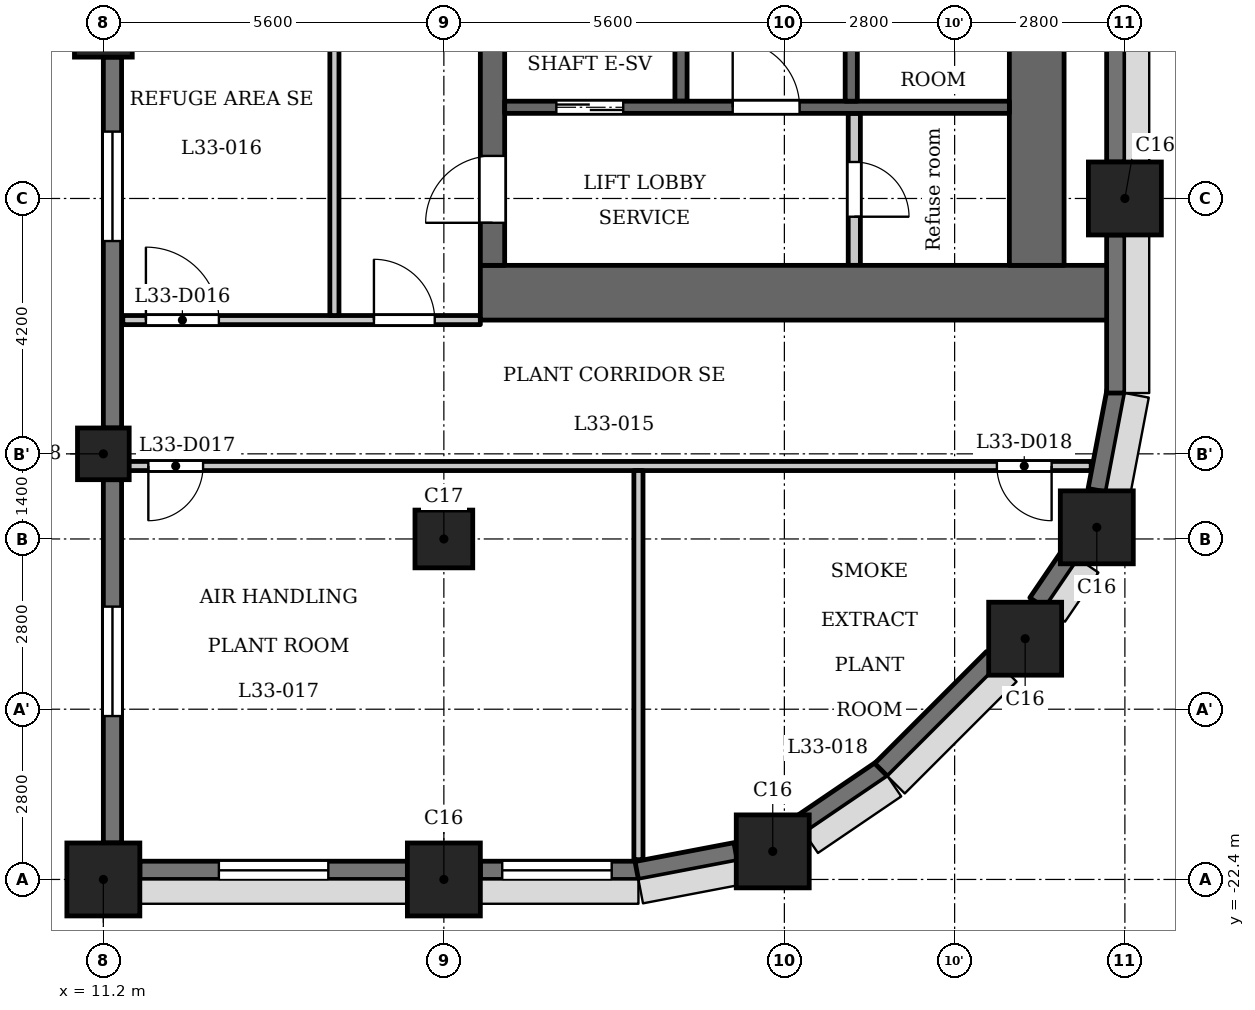
"""IFC4 building model, lengths in metres.
Left out: names, types, materials, properties, quantities, classifications, styles, units other than length and angle.
Written with IfcOpenShell. Run it as: python <this file> out.ifc"""

import sys

from ifc_helpers import new_model, si_unit, direction, frame, frame_2d, origin, origin_2d, place, context, subcontext, project, spatial, rectangle, extrude, element, fill, save


model = new_model("IFC4")
c1 = context("Model", 3, precision=1e-05, world=origin(), true_north=direction((0.0, 1.0)))
c2 = subcontext(c1, "Body", "Model", "MODEL_VIEW")
j1 = project(units=[si_unit("LENGTHUNIT", "METRE"), si_unit("PLANEANGLEUNIT", "RADIAN")], contexts=[c1])
p1 = place(None, origin())
s1 = spatial("IfcSite", under=j1, at=p1, CompositionType="ELEMENT")
p2 = place(p1, origin())
s2 = spatial("IfcBuilding", under=s1, at=p2, CompositionType="ELEMENT")
p3 = place(p2, frame((0.0, 0.0, 130.7)))
s3 = spatial("IfcBuildingStorey", under=s2, at=p3, CompositionType="ELEMENT", Elevation=130.7)
for number, where, z_axis, x_axis in (
    (1, (11.2, -22.4, 0.0), (0.0, 0.0, 1.0), (1.0, 0.0, 0.0)),
    (2, (16.8, -22.4, 0.0), (0.0, 0.0, 1.0), (1.0, 0.0, 0.0)),
    (3, (22.209, -21.938, 0.0), (0.0, 0.0, 1.0), (1.0, 0.0, 0.0)),
    (4, (26.36, -18.44, 0.0), (0.0, 0.0, 1.0), (1.0, 0.0, 0.0)),
    (5, (27.538, -16.609, 0.0), (0.0, 0.0, 1.0), (1.0, 0.0, 0.0)),
    (6, (28.0, -11.2, 0.0), (0.0, 0.0, 1.0), (1.0, 0.0, 0.0)),
):
    element("IfcColumn", number, at=place(p3, frame(where, z_axis=z_axis, x_axis=x_axis)), inside=s3, PredefinedType="COLUMN", context=c2, shape_type="SweptSolid", body=[
        extrude(rectangle(XDim=1.2, YDim=1.2, at=origin_2d()), origin(), (0.0, 0.0, 1.0), 5.4),
    ])
for number, where, z_axis, x_axis in (
    (7, (16.8, -16.8, 0.0), (0.0, 0.0, 1.0), (1.0, 0.0, 0.0)),
    (8, (11.2, -8.4, 0.0), (0.0, 0.0, 1.0), (1.0, 0.0, 0.0)),
):
    element("IfcColumn", number, at=place(p3, frame(where, z_axis=z_axis, x_axis=x_axis)), inside=s3, PredefinedType="COLUMN", context=c2, shape_type="SweptSolid", body=[
        extrude(rectangle(XDim=0.95, YDim=0.95, at=origin_2d()), origin(), (0.0, 0.0, 1.0), 5.4),
    ])
p4 = place(p3, frame((11.2, -15.4, 0.0), z_axis=(0.0, 0.0, 1.0), x_axis=(1.0, 0.0, 0.0)))
e9 = element("IfcColumn", 9, at=p4, inside=s3, PredefinedType="COLUMN", context=c2, shape_type="SweptSolid", body=[
    extrude(rectangle(XDim=0.85, YDim=0.85, at=origin_2d()), origin(), (0.0, 0.0, 1.0), 5.4),
])
p5 = place(p3, frame((11.35, -8.875, 0.0), z_axis=(0.0, 0.0, 1.0), x_axis=(0.0, -1.0, 0.0)))
e10 = element("IfcWall", 10, at=p5, inside=s3, PredefinedType="SOLIDWALL", context=c2, shape_type="SweptSolid", body=[
    extrude(rectangle(XDim=6.1, YDim=0.3, at=frame_2d((3.05, 0.0))), origin(), (0.0, 0.0, 1.0), 5.1),
])
p6 = place(p5, frame((1.225, 0.0, 0.9)))
e11 = element("IfcOpeningElement", 11, at=p6, cuts=e10, PredefinedType="OPENING", context=c2, shape_type="SweptSolid", body=[
    extrude(rectangle(XDim=1.8, YDim=1.5, at=frame_2d((0.9, 0.75))), frame((0.0, 0.16, 0.0), z_axis=(0.0, -1.0, 0.0), x_axis=(1.0, 0.0, 0.0)), (0.0, 0.0, 1.0), 0.32),
])
p7 = place(p3, frame((11.35, -15.825, 0.0), z_axis=(0.0, 0.0, 1.0), x_axis=(0.0, -1.0, 0.0)))
e12 = element("IfcWall", 12, at=p7, inside=s3, PredefinedType="SOLIDWALL", context=c2, shape_type="SweptSolid", body=[
    extrude(rectangle(XDim=5.975, YDim=0.3, at=frame_2d((2.988, 0.0))), origin(), (0.0, 0.0, 1.0), 5.1),
])
p8 = place(p7, frame((2.087, 0.0, 0.9)))
e13 = element("IfcOpeningElement", 13, at=p8, cuts=e12, PredefinedType="OPENING", context=c2, shape_type="SweptSolid", body=[
    extrude(rectangle(XDim=1.8, YDim=1.5, at=frame_2d((0.9, 0.75))), frame((0.0, 0.16, 0.0), z_axis=(0.0, -1.0, 0.0), x_axis=(1.0, 0.0, 0.0)), (0.0, 0.0, 1.0), 0.32),
])
p9 = place(p3, frame((11.8, -22.25, 0.0), z_axis=(0.0, 0.0, 1.0), x_axis=(1.0, 0.0, 0.0)))
e14 = element("IfcWall", 14, at=p9, inside=s3, PredefinedType="SOLIDWALL", context=c2, shape_type="SweptSolid", body=[
    extrude(rectangle(XDim=4.4, YDim=0.3, at=frame_2d((2.2, 0.0))), origin(), (0.0, 0.0, 1.0), 4.3),
])
p10 = place(p9, frame((1.3, 0.0, 0.9)))
e15 = element("IfcOpeningElement", 15, at=p10, cuts=e14, PredefinedType="OPENING", context=c2, shape_type="SweptSolid", body=[
    extrude(rectangle(XDim=1.8, YDim=1.5, at=frame_2d((0.9, 0.75))), frame((0.0, 0.16, 0.0), z_axis=(0.0, -1.0, 0.0), x_axis=(1.0, 0.0, 0.0)), (0.0, 0.0, 1.0), 0.32),
])
p11 = place(p3, frame((17.4, -22.25, 0.0), z_axis=(0.0, 0.0, 1.0), x_axis=(1.0, 0.0, 0.0)))
e16 = element("IfcWall", 16, at=p11, inside=s3, PredefinedType="SOLIDWALL", context=c2, shape_type="SweptSolid", body=[
    extrude(rectangle(XDim=2.6, YDim=0.3, at=frame_2d((1.3, 0.0))), origin(), (0.0, 0.0, 1.0), 4.3),
])
p12 = place(p11, frame((0.36, 0.0, 0.9)))
e17 = element("IfcOpeningElement", 17, at=p12, cuts=e16, PredefinedType="OPENING", context=c2, shape_type="SweptSolid", body=[
    extrude(rectangle(XDim=1.8, YDim=1.5, at=frame_2d((0.9, 0.75))), frame((0.0, 0.16, 0.0), z_axis=(0.0, -1.0, 0.0), x_axis=(1.0, 0.0, 0.0)), (0.0, 0.0, 1.0), 0.32),
])
for number, where, z_axis, x_axis in (
    (18, (19.972, -22.253, 0.0), (0.0, 0.0, 1.0), (0.982, 0.187, 0.0)),
    (19, (22.643, -21.51, 0.0), (0.0, 0.0, 1.0), (0.827, 0.562, 0.0)),
):
    element("IfcWall", number, at=place(p3, frame(where, z_axis=z_axis, x_axis=x_axis)), inside=s3, PredefinedType="SOLIDWALL", context=c2, shape_type="SweptSolid", body=[
        extrude(rectangle(XDim=1.656, YDim=0.3, at=frame_2d((0.828, 0.0))), origin(), (0.0, 0.0, 1.0), 4.3),
    ])
p13 = place(p3, frame((23.991, -20.597, 0.0), z_axis=(0.0, 0.0, 1.0), x_axis=(0.707106781187, 0.707106781187, 0.0)))
e20 = element("IfcWall", 20, at=p13, inside=s3, PredefinedType="SOLIDWALL", context=c2, shape_type="SweptSolid", body=[
    extrude(rectangle(XDim=2.6, YDim=0.3, at=frame_2d((1.3, 0.0))), origin(), (0.0, 0.0, 1.0), 4.3),
])
p14 = place(p3, frame((26.561, -17.851, 0.0), z_axis=(0.0, 0.0, 1.0), x_axis=(0.562173331661, 0.827019434577, 0.0)))
e21 = element("IfcWall", 21, at=p14, inside=s3, PredefinedType="SOLIDWALL", context=c2, shape_type="SweptSolid", body=[
    extrude(rectangle(XDim=0.977, YDim=0.3, at=frame_2d((0.489, 0.0))), origin(), (0.0, 0.0, 1.0), 5.1),
])
p15 = place(p3, frame((27.542, -15.999, 0.0), z_axis=(0.0, 0.0, 1.0), x_axis=(0.187349172861, 0.982293381546, 0.0)))
e22 = element("IfcWall", 22, at=p15, inside=s3, PredefinedType="SOLIDWALL", context=c2, shape_type="SweptSolid", body=[
    extrude(rectangle(XDim=1.656, YDim=0.3, at=frame_2d((0.828, 0.0))), origin(), (0.0, 0.0, 1.0), 4.3),
])
p16 = place(p3, frame((27.85, -14.4, 0.0), z_axis=(0.0, 0.0, 1.0), x_axis=(0.0, 1.0, 0.0)))
e23 = element("IfcWall", 23, at=p16, inside=s3, PredefinedType="SOLIDWALL", context=c2, shape_type="SweptSolid", body=[
    extrude(rectangle(XDim=2.6, YDim=0.3, at=frame_2d((1.3, 0.0))), origin(), (0.0, 0.0, 1.0), 4.3),
])
p17 = place(p3, frame((27.85, -10.6, 0.0), z_axis=(0.0, 0.0, 1.0), x_axis=(0.0, 1.0, 0.0)))
e24 = element("IfcWall", 24, at=p17, inside=s3, PredefinedType="SOLIDWALL", context=c2, shape_type="SweptSolid", body=[
    extrude(rectangle(XDim=4.4, YDim=0.3, at=frame_2d((2.2, 0.0))), origin(), (0.0, 0.0, 1.0), 4.3),
])
p18 = place(p3, frame((20.7, -9.6, 0.0), z_axis=(0.0, 0.0, 1.0), x_axis=(0.0, 1.0, 0.0)))
e25 = element("IfcWall", 25, at=p18, inside=s3, PredefinedType="SHEAR", context=c2, shape_type="SweptSolid", body=[
    extrude(rectangle(XDim=9.75, YDim=0.2, at=frame_2d((4.875, 0.0))), origin(), (0.0, 0.0, 1.0), 5.1),
])
p19 = place(p3, frame((17.4, -12.75, 0.0), z_axis=(0.0, 0.0, 1.0), x_axis=(1.0, 0.0, 0.0)))
e26 = element("IfcWall", 26, at=p19, inside=s3, PredefinedType="SHEAR", context=c2, shape_type="SweptSolid", body=[
    extrude(rectangle(XDim=10.4, YDim=0.9, at=frame_2d((5.2, 0.0))), origin(), (0.0, 0.0, 1.0), 5.1),
])
p20 = place(p3, frame((17.6, -12.3, 0.0), z_axis=(0.0, 0.0, 1.0), x_axis=(0.0, 1.0, 0.0)))
e27 = element("IfcWall", 27, at=p20, inside=s3, PredefinedType="SHEAR", context=c2, shape_type="SweptSolid", body=[
    extrude(rectangle(XDim=24.6, YDim=0.4, at=frame_2d((12.3, 0.0))), origin(), (0.0, 0.0, 1.0), 5.1),
])
p21 = place(p20, frame((15.45, 0.0, 0.0)))
e28 = element("IfcOpeningElement", 28, at=p21, cuts=e27, PredefinedType="OPENING", context=c2, shape_type="SweptSolid", body=[
    extrude(rectangle(XDim=1.1, YDim=2.1, at=frame_2d((0.55, 1.05))), frame((0.0, 0.21, 0.0), z_axis=(0.0, -1.0, 0.0), x_axis=(1.0, 0.0, 0.0)), (0.0, 0.0, 1.0), 0.42),
])
p22 = place(p20, frame((17.85, 0.0, 0.0)))
e29 = element("IfcOpeningElement", 29, at=p22, cuts=e27, PredefinedType="OPENING", context=c2, shape_type="SweptSolid", body=[
    extrude(rectangle(XDim=1.1, YDim=2.1, at=frame_2d((0.55, 1.05))), frame((0.0, 0.21, 0.0), z_axis=(0.0, -1.0, 0.0), x_axis=(1.0, 0.0, 0.0)), (0.0, 0.0, 1.0), 0.42),
])
p23 = place(p20, frame((22.8, 0.0, 0.0)))
e30 = element("IfcOpeningElement", 30, at=p23, cuts=e27, PredefinedType="OPENING", context=c2, shape_type="SweptSolid", body=[
    extrude(rectangle(XDim=1.1, YDim=2.1, at=frame_2d((0.55, 1.05))), frame((0.0, 0.21, 0.0), z_axis=(0.0, -1.0, 0.0), x_axis=(1.0, 0.0, 0.0)), (0.0, 0.0, 1.0), 0.42),
])
p24 = place(p20, frame((0.7, 0.0, 0.0)))
e31 = element("IfcOpeningElement", 31, at=p24, cuts=e27, PredefinedType="OPENING", context=c2, shape_type="SweptSolid", body=[
    extrude(rectangle(XDim=1.1, YDim=2.1, at=frame_2d((0.55, 1.05))), frame((0.0, 0.21, 0.0), z_axis=(0.0, -1.0, 0.0), x_axis=(1.0, 0.0, 0.0)), (0.0, 0.0, 1.0), 0.42),
])
p25 = place(p20, frame((12.775, 0.0, 0.0)))
e32 = element("IfcOpeningElement", 32, at=p25, cuts=e27, PredefinedType="OPENING", context=c2, shape_type="SweptSolid", body=[
    extrude(rectangle(XDim=1.8, YDim=2.1, at=frame_2d((0.9, 1.05))), frame((0.0, 0.21, 0.0), z_axis=(0.0, -1.0, 0.0), x_axis=(1.0, 0.0, 0.0)), (0.0, 0.0, 1.0), 0.42),
])
p26 = place(p3, frame((26.55, -12.3, 0.0), z_axis=(0.0, 0.0, 1.0), x_axis=(0.0, 1.0, 0.0)))
e33 = element("IfcWall", 33, at=p26, inside=s3, PredefinedType="SHEAR", context=c2, shape_type="SweptSolid", body=[
    extrude(rectangle(XDim=24.6, YDim=0.9, at=frame_2d((12.3, 0.0))), origin(), (0.0, 0.0, 1.0), 5.1),
])
p27 = place(p3, frame((23.55, -12.3, 0.0), z_axis=(0.0, 0.0, 1.0), x_axis=(0.0, 1.0, 0.0)))
e34 = element("IfcWall", 34, at=p27, inside=s3, PredefinedType="PARTITIONING", context=c2, shape_type="SweptSolid", body=[
    extrude(rectangle(XDim=2.5, YDim=0.2, at=frame_2d((1.25, 0.0))), origin(), (0.0, 0.0, 1.0), 5.1),
])
p28 = place(p27, frame((0.8, 0.0, 0.0)))
e35 = element("IfcOpeningElement", 35, at=p28, cuts=e34, PredefinedType="OPENING", context=c2, shape_type="SweptSolid", body=[
    extrude(rectangle(XDim=0.9, YDim=2.1, at=frame_2d((0.45, 1.05))), frame((0.0, 0.11, 0.0), z_axis=(0.0, -1.0, 0.0), x_axis=(1.0, 0.0, 0.0)), (0.0, 0.0, 1.0), 0.22),
])
p29 = place(p3, frame((17.8, -9.7, 0.0), z_axis=(0.0, 0.0, 1.0), x_axis=(1.0, 0.0, 0.0)))
e36 = element("IfcWall", 36, at=p29, inside=s3, PredefinedType="SHEAR", context=c2, shape_type="SweptSolid", body=[
    extrude(rectangle(XDim=8.3, YDim=0.2, at=frame_2d((4.15, 0.0))), origin(), (0.0, 0.0, 1.0), 5.1),
])
p30 = place(p29, frame((0.85, 0.0, 0.0)))
e37 = element("IfcOpeningElement", 37, at=p30, cuts=e36, PredefinedType="OPENING", context=c2, shape_type="SweptSolid", body=[
    extrude(rectangle(XDim=1.1, YDim=2.1, at=frame_2d((0.55, 1.05))), frame((0.0, 0.11, 0.0), z_axis=(0.0, -1.0, 0.0), x_axis=(1.0, 0.0, 0.0)), (0.0, 0.0, 1.0), 0.22),
])
p31 = place(p29, frame((3.75, 0.0, 0.0)))
e38 = element("IfcOpeningElement", 38, at=p31, cuts=e36, PredefinedType="OPENING", context=c2, shape_type="SweptSolid", body=[
    extrude(rectangle(XDim=1.1, YDim=2.1, at=frame_2d((0.55, 1.05))), frame((0.0, 0.11, 0.0), z_axis=(0.0, -1.0, 0.0), x_axis=(1.0, 0.0, 0.0)), (0.0, 0.0, 1.0), 0.22),
])
p32 = place(p3, frame((23.5, -9.6, 0.0), z_axis=(0.0, 0.0, 1.0), x_axis=(0.0, 1.0, 0.0)))
e39 = element("IfcWall", 39, at=p32, inside=s3, PredefinedType="SHEAR", context=c2, shape_type="SweptSolid", body=[
    extrude(rectangle(XDim=6.9, YDim=0.2, at=frame_2d((3.45, 0.0))), origin(), (0.0, 0.0, 1.0), 5.1),
])
p33 = place(p3, frame((11.29, -15.6, 0.0), z_axis=(0.0, 0.0, 1.0), x_axis=(1.0, 0.0, 0.0)))
e40 = element("IfcWall", 40, at=p33, inside=s3, PredefinedType="PARTITIONING", context=c2, shape_type="SweptSolid", body=[
    extrude(rectangle(XDim=16.156, YDim=0.15, at=frame_2d((8.078, 0.0))), origin(), (0.0, 0.0, 1.0), 5.1),
])
p34 = place(p33, frame((0.65, 0.0, 0.0)))
e41 = element("IfcOpeningElement", 41, at=p34, cuts=e40, PredefinedType="OPENING", context=c2, shape_type="SweptSolid", body=[
    extrude(rectangle(XDim=0.9, YDim=2.1, at=frame_2d((0.45, 1.05))), frame((0.0, 0.085, 0.0), z_axis=(0.0, -1.0, 0.0), x_axis=(1.0, 0.0, 0.0)), (0.0, 0.0, 1.0), 0.17),
])
p35 = place(p33, frame((14.605, 0.0, 0.0)))
e42 = element("IfcOpeningElement", 42, at=p35, cuts=e40, PredefinedType="OPENING", context=c2, shape_type="SweptSolid", body=[
    extrude(rectangle(XDim=0.9, YDim=2.1, at=frame_2d((0.45, 1.05))), frame((0.0, 0.085, 0.0), z_axis=(0.0, -1.0, 0.0), x_axis=(1.0, 0.0, 0.0)), (0.0, 0.0, 1.0), 0.17),
])
p36 = place(p3, frame((11.52, -13.2, 0.0), z_axis=(0.0, 0.0, 1.0), x_axis=(1.0, 0.0, 0.0)))
e43 = element("IfcWall", 43, at=p36, inside=s3, PredefinedType="PARTITIONING", context=c2, shape_type="SweptSolid", body=[
    extrude(rectangle(XDim=5.88, YDim=0.15, at=frame_2d((2.94, 0.0))), origin(), (0.0, 0.0, 1.0), 5.1),
])
p37 = place(p36, frame((4.13, 0.0, 0.0)))
e44 = element("IfcOpeningElement", 44, at=p37, cuts=e43, PredefinedType="OPENING", context=c2, shape_type="SweptSolid", body=[
    extrude(rectangle(XDim=1.0, YDim=2.1, at=frame_2d((0.5, 1.05))), frame((0.0, 0.085, 0.0), z_axis=(0.0, -1.0, 0.0), x_axis=(1.0, 0.0, 0.0)), (0.0, 0.0, 1.0), 0.17),
])
p38 = place(p36, frame((0.38, 0.0, 0.0)))
e45 = element("IfcOpeningElement", 45, at=p38, cuts=e43, PredefinedType="OPENING", context=c2, shape_type="SweptSolid", body=[
    extrude(rectangle(XDim=1.2, YDim=2.1, at=frame_2d((0.6, 1.05))), frame((0.0, 0.085, 0.0), z_axis=(0.0, -1.0, 0.0), x_axis=(1.0, 0.0, 0.0)), (0.0, 0.0, 1.0), 0.17),
])
p39 = place(p3, frame((15.0, -13.125, 0.0), z_axis=(0.0, 0.0, 1.0), x_axis=(0.0, 1.0, 0.0)))
e46 = element("IfcWall", 46, at=p39, inside=s3, PredefinedType="PARTITIONING", context=c2, shape_type="SweptSolid", body=[
    extrude(rectangle(XDim=6.356, YDim=0.15, at=frame_2d((3.178, 0.0))), origin(), (0.0, 0.0, 1.0), 5.1),
])
p40 = place(p3, frame((20.0, -22.075, 0.0), z_axis=(0.0, 0.0, 1.0), x_axis=(0.0, 1.0, 0.0)))
e47 = element("IfcWall", 47, at=p40, inside=s3, PredefinedType="PARTITIONING", context=c2, shape_type="SweptSolid", body=[
    extrude(rectangle(XDim=6.4, YDim=0.15, at=frame_2d((3.2, 0.0))), origin(), (0.0, 0.0, 1.0), 5.1),
])
p41 = place(p30, origin())
e48 = element("IfcDoor", 48, at=p41, inside=s3, OperationType="DOUBLE_DOOR_SLIDING", PredefinedType="DOOR", context=c2, shape_type="SweptSolid", body=[
    extrude(rectangle(XDim=1.1, YDim=2.1, at=frame_2d((0.55, 1.05))), frame((0.0, 0.025, 0.0), z_axis=(0.0, -1.0, 0.0), x_axis=(1.0, 0.0, 0.0)), (0.0, 0.0, 1.0), 0.05),
])
fill(e37, e48)
p42 = place(p24, origin())
e49 = element("IfcDoor", 49, at=p42, inside=s3, OperationType="SINGLE_SWING_RIGHT", PredefinedType="DOOR", context=c2, shape_type="SweptSolid", body=[
    extrude(rectangle(XDim=1.1, YDim=2.1, at=frame_2d((0.55, 1.05))), frame((0.0, 0.025, 0.0), z_axis=(0.0, -1.0, 0.0), x_axis=(1.0, 0.0, 0.0)), (0.0, 0.0, 1.0), 0.05),
])
fill(e31, e49)
p43 = place(p28, origin())
e50 = element("IfcDoor", 50, at=p43, inside=s3, OperationType="SINGLE_SWING_LEFT", PredefinedType="DOOR", context=c2, shape_type="SweptSolid", body=[
    extrude(rectangle(XDim=0.9, YDim=2.1, at=frame_2d((0.45, 1.05))), frame((0.0, 0.025, 0.0), z_axis=(0.0, -1.0, 0.0), x_axis=(1.0, 0.0, 0.0)), (0.0, 0.0, 1.0), 0.05),
])
fill(e35, e50)
p44 = place(p31, origin())
e51 = element("IfcDoor", 51, at=p44, inside=s3, OperationType="SINGLE_SWING_RIGHT", PredefinedType="DOOR", context=c2, shape_type="SweptSolid", body=[
    extrude(rectangle(XDim=1.1, YDim=2.1, at=frame_2d((0.55, 1.05))), frame((0.0, 0.025, 0.0), z_axis=(0.0, -1.0, 0.0), x_axis=(1.0, 0.0, 0.0)), (0.0, 0.0, 1.0), 0.05),
])
fill(e38, e51)
p45 = place(p37, origin())
e52 = element("IfcDoor", 52, at=p45, inside=s3, OperationType="SINGLE_SWING_RIGHT", PredefinedType="DOOR", context=c2, shape_type="SweptSolid", body=[
    extrude(rectangle(XDim=1.0, YDim=2.1, at=frame_2d((0.5, 1.05))), frame((0.0, 0.025, 0.0), z_axis=(0.0, -1.0, 0.0), x_axis=(1.0, 0.0, 0.0)), (0.0, 0.0, 1.0), 0.05),
])
fill(e44, e52)
p46 = place(p38, origin())
e53 = element("IfcDoor", 53, at=p46, inside=s3, OperationType="SINGLE_SWING_RIGHT", PredefinedType="DOOR", context=c2, shape_type="SweptSolid", body=[
    extrude(rectangle(XDim=1.2, YDim=2.1, at=frame_2d((0.6, 1.05))), frame((0.0, 0.025, 0.0), z_axis=(0.0, -1.0, 0.0), x_axis=(1.0, 0.0, 0.0)), (0.0, 0.0, 1.0), 0.05),
])
fill(e45, e53)
p47 = place(p34, origin())
e54 = element("IfcDoor", 54, at=p47, inside=s3, OperationType="SINGLE_SWING_LEFT", PredefinedType="DOOR", context=c2, shape_type="SweptSolid", body=[
    extrude(rectangle(XDim=0.9, YDim=2.1, at=frame_2d((0.45, 1.05))), frame((0.0, 0.025, 0.0), z_axis=(0.0, -1.0, 0.0), x_axis=(1.0, 0.0, 0.0)), (0.0, 0.0, 1.0), 0.05),
])
fill(e41, e54)
p48 = place(p35, origin())
e55 = element("IfcDoor", 55, at=p48, inside=s3, OperationType="SINGLE_SWING_RIGHT", PredefinedType="DOOR", context=c2, shape_type="SweptSolid", body=[
    extrude(rectangle(XDim=0.9, YDim=2.1, at=frame_2d((0.45, 1.05))), frame((0.0, 0.025, 0.0), z_axis=(0.0, -1.0, 0.0), x_axis=(1.0, 0.0, 0.0)), (0.0, 0.0, 1.0), 0.05),
])
fill(e42, e55)
p49 = place(p6, origin())
e56 = element("IfcWindow", 56, at=p49, inside=s3, PartitioningType="SINGLE_PANEL", PredefinedType="WINDOW", context=c2, shape_type="SweptSolid", body=[
    extrude(rectangle(XDim=1.8, YDim=1.5, at=frame_2d((0.9, 0.75))), frame((0.0, 0.03, 0.0), z_axis=(0.0, -1.0, 0.0), x_axis=(1.0, 0.0, 0.0)), (0.0, 0.0, 1.0), 0.06),
])
fill(e11, e56)
p50 = place(p8, origin())
e57 = element("IfcWindow", 57, at=p50, inside=s3, PartitioningType="SINGLE_PANEL", PredefinedType="WINDOW", context=c2, shape_type="SweptSolid", body=[
    extrude(rectangle(XDim=1.8, YDim=1.5, at=frame_2d((0.9, 0.75))), frame((0.0, 0.03, 0.0), z_axis=(0.0, -1.0, 0.0), x_axis=(1.0, 0.0, 0.0)), (0.0, 0.0, 1.0), 0.06),
])
fill(e13, e57)
p51 = place(p10, origin())
e58 = element("IfcWindow", 58, at=p51, inside=s3, PartitioningType="SINGLE_PANEL", PredefinedType="WINDOW", context=c2, shape_type="SweptSolid", body=[
    extrude(rectangle(XDim=1.8, YDim=1.5, at=frame_2d((0.9, 0.75))), frame((0.0, 0.03, 0.0), z_axis=(0.0, -1.0, 0.0), x_axis=(1.0, 0.0, 0.0)), (0.0, 0.0, 1.0), 0.06),
])
fill(e15, e58)
p52 = place(p12, origin())
e59 = element("IfcWindow", 59, at=p52, inside=s3, PartitioningType="SINGLE_PANEL", PredefinedType="WINDOW", context=c2, shape_type="SweptSolid", body=[
    extrude(rectangle(XDim=1.8, YDim=1.5, at=frame_2d((0.9, 0.75))), frame((0.0, 0.03, 0.0), z_axis=(0.0, -1.0, 0.0), x_axis=(1.0, 0.0, 0.0)), (0.0, 0.0, 1.0), 0.06),
])
fill(e17, e59)
save(model, sys.argv[1])
